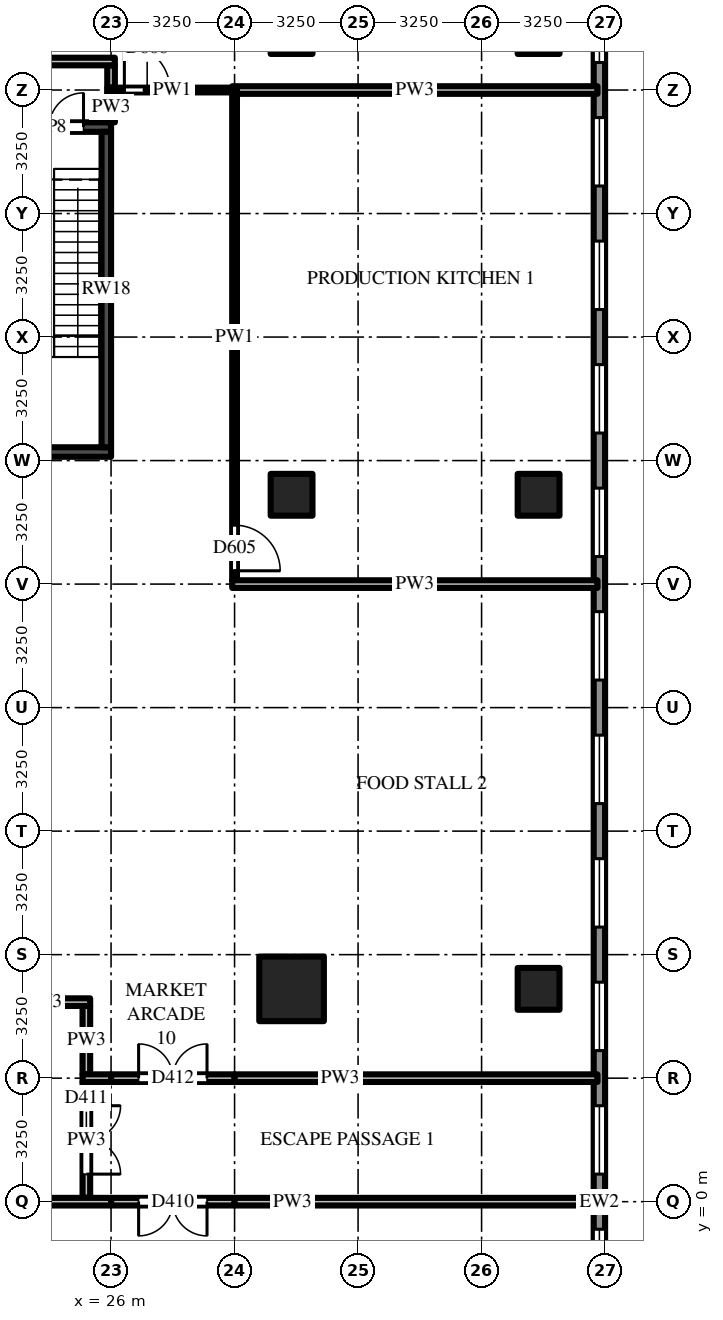
"""IFC4 building model, lengths in metres.
Left out: names, types, materials, properties, quantities, classifications, styles, units other than length and angle.
Written with IfcOpenShell. Run it as: python <this file> out.ifc"""

import sys

from ifc_helpers import new_model, si_unit, direction, frame, frame_2d, origin, origin_2d, place, context, subcontext, project, spatial, rectangle, extrude, source, transform, mapped, element, fill, save


model = new_model("IFC4")
c1 = context("Model", 3, precision=1e-05, world=origin(), true_north=direction((0.0, 1.0)))
c2 = subcontext(c1, "Body", "Model", "MODEL_VIEW")
j1 = project(units=[si_unit("LENGTHUNIT", "METRE"), si_unit("PLANEANGLEUNIT", "RADIAN")], contexts=[c1])
p1 = place(None, origin())
s1 = spatial("IfcSite", under=j1, at=p1, CompositionType="ELEMENT")
p2 = place(p1, origin())
s2 = spatial("IfcBuilding", under=s1, at=p2, CompositionType="ELEMENT")
p3 = place(p2, frame((0.0, 0.0, 14.0)))
s3 = spatial("IfcBuildingStorey", under=s2, at=p3, CompositionType="ELEMENT", Elevation=14.0)
m1 = source(origin(), c2, "Body", "SweptSolid", [
    extrude(rectangle(XDim=1.7, YDim=1.7, at=origin_2d()), origin(), (0.0, 0.0, 1.0), 5.0),
])
p4 = place(p3, frame((30.75, 5.6, 0.0), z_axis=(0.0, 0.0, 1.0), x_axis=(1.0, 0.0, 0.0)))
e1 = element("IfcColumn", 1, at=p4, inside=s3, PredefinedType="COLUMN", context=c2, shape_type="MappedRepresentation", body=[
    mapped(m1, transform((0.0, 0.0, 0.0))),
])
m2 = source(origin(), c2, "Body", "SweptSolid", [
    extrude(rectangle(XDim=1.1, YDim=1.1, at=origin_2d()), origin(), (0.0, 0.0, 1.0), 5.0),
])
for number, where, z_axis, x_axis in (
    (2, (30.75, 18.6, 0.0), (0.0, 0.0, 1.0), (1.0, 0.0, 0.0)),
    (3, (30.75, 30.75, 0.0), (0.0, 0.0, 1.0), (1.0, 0.0, 0.0)),
    (4, (37.25, 5.6, 0.0), (0.0, 0.0, 1.0), (1.0, 0.0, 0.0)),
    (5, (37.25, 18.6, 0.0), (0.0, 0.0, 1.0), (1.0, 0.0, 0.0)),
    (6, (37.25, 30.75, 0.0), (0.0, 0.0, 1.0), (1.0, 0.0, 0.0)),
):
    element("IfcColumn", number, at=place(p3, frame(where, z_axis=z_axis, x_axis=x_axis)), inside=s3, PredefinedType="COLUMN", context=c2, shape_type="MappedRepresentation", body=[
        mapped(m2, transform((0.0, 0.0, 0.0))),
    ])
m3 = source(origin(), c2, "Body", "SweptSolid", [
    extrude(rectangle(XDim=6.5, YDim=0.25, at=frame_2d((3.25, 0.0))), origin(), (0.0, 0.0, 1.0), 4.7),
])
p5 = place(p3, frame((19.5, 28.275, 0.0), z_axis=(0.0, 0.0, 1.0), x_axis=(1.0, 0.0, 0.0)))
e7 = element("IfcWall", 7, at=p5, inside=s3, PredefinedType="SHEAR", context=c2, shape_type="MappedRepresentation", body=[
    mapped(m3, transform((0.0, 0.0, 0.0))),
])
m4 = source(origin(), c2, "Body", "SweptSolid", [
    extrude(rectangle(XDim=1.8, YDim=2.1, at=frame_2d((0.9, 1.05))), frame((0.0, 0.135, 0.0), z_axis=(0.0, -1.0, 0.0), x_axis=(1.0, 0.0, 0.0)), (0.0, 0.0, 1.0), 0.27),
])
p6 = place(p5, frame((0.725, 0.0, 0.0)))
e8 = element("IfcOpeningElement", 8, at=p6, cuts=e7, PredefinedType="OPENING", context=c2, shape_type="MappedRepresentation", body=[
    mapped(m4, transform((0.0, 0.0, 0.0))),
])
p7 = place(p5, frame((3.975, 0.0, 0.0)))
e9 = element("IfcOpeningElement", 9, at=p7, cuts=e7, PredefinedType="OPENING", context=c2, shape_type="MappedRepresentation", body=[
    mapped(m4, transform((0.0, 0.0, 0.0))),
])
p8 = place(p3, frame((19.5, 19.725, 0.0), z_axis=(0.0, 0.0, 1.0), x_axis=(1.0, 0.0, 0.0)))
e10 = element("IfcWall", 10, at=p8, inside=s3, PredefinedType="SHEAR", context=c2, shape_type="MappedRepresentation", body=[
    mapped(m3, transform((0.0, 0.0, 0.0))),
])
m5 = source(origin(), c2, "Body", "SweptSolid", [
    extrude(rectangle(XDim=8.3, YDim=0.25, at=frame_2d((4.15, 0.0))), origin(), (0.0, 0.0, 1.0), 4.7),
])
p9 = place(p3, frame((25.875, 19.85, 0.0), z_axis=(0.0, 0.0, 1.0), x_axis=(0.0, 1.0, 0.0)))
e11 = element("IfcWall", 11, at=p9, inside=s3, PredefinedType="SHEAR", context=c2, shape_type="MappedRepresentation", body=[
    mapped(m5, transform((0.0, 0.0, 0.0))),
])
m6 = source(origin(), c2, "Body", "SweptSolid", [
    extrude(rectangle(XDim=71.5, YDim=0.3, at=frame_2d((35.75, 0.0))), origin(), (0.0, 0.0, 1.0), 4.7),
])
p10 = place(p3, frame((38.85, -35.75, 0.0), z_axis=(0.0, 0.0, 1.0), x_axis=(0.0, 1.0, 0.0)))
e12 = element("IfcWall", 12, at=p10, inside=s3, PredefinedType="SOLIDWALL", context=c2, shape_type="MappedRepresentation", body=[
    mapped(m6, transform((0.0, 0.0, 0.0))),
])
m7 = source(origin(), c2, "Body", "SweptSolid", [
    extrude(rectangle(XDim=1.8, YDim=3.0, at=frame_2d((0.9, 1.5))), frame((0.0, 0.16, 0.0), z_axis=(0.0, -1.0, 0.0), x_axis=(1.0, 0.0, 0.0)), (0.0, 0.0, 1.0), 0.32),
])
p11 = place(p10, frame((0.725, 0.0, 0.9)))
e13 = element("IfcOpeningElement", 13, at=p11, cuts=e12, PredefinedType="OPENING", context=c2, shape_type="MappedRepresentation", body=[
    mapped(m7, transform((0.0, 0.0, 0.0))),
])
p12 = place(p10, frame((3.975, 0.0, 0.9)))
e14 = element("IfcOpeningElement", 14, at=p12, cuts=e12, PredefinedType="OPENING", context=c2, shape_type="MappedRepresentation", body=[
    mapped(m7, transform((0.0, 0.0, 0.0))),
])
p13 = place(p10, frame((7.225, 0.0, 0.9)))
e15 = element("IfcOpeningElement", 15, at=p13, cuts=e12, PredefinedType="OPENING", context=c2, shape_type="MappedRepresentation", body=[
    mapped(m7, transform((0.0, 0.0, 0.0))),
])
p14 = place(p10, frame((10.475, 0.0, 0.9)))
e16 = element("IfcOpeningElement", 16, at=p14, cuts=e12, PredefinedType="OPENING", context=c2, shape_type="MappedRepresentation", body=[
    mapped(m7, transform((0.0, 0.0, 0.0))),
])
p15 = place(p10, frame((13.725, 0.0, 0.9)))
e17 = element("IfcOpeningElement", 17, at=p15, cuts=e12, PredefinedType="OPENING", context=c2, shape_type="MappedRepresentation", body=[
    mapped(m7, transform((0.0, 0.0, 0.0))),
])
p16 = place(p10, frame((16.975, 0.0, 0.9)))
e18 = element("IfcOpeningElement", 18, at=p16, cuts=e12, PredefinedType="OPENING", context=c2, shape_type="MappedRepresentation", body=[
    mapped(m7, transform((0.0, 0.0, 0.0))),
])
p17 = place(p10, frame((20.225, 0.0, 0.9)))
e19 = element("IfcOpeningElement", 19, at=p17, cuts=e12, PredefinedType="OPENING", context=c2, shape_type="MappedRepresentation", body=[
    mapped(m7, transform((0.0, 0.0, 0.0))),
])
p18 = place(p10, frame((23.475, 0.0, 0.9)))
e20 = element("IfcOpeningElement", 20, at=p18, cuts=e12, PredefinedType="OPENING", context=c2, shape_type="MappedRepresentation", body=[
    mapped(m7, transform((0.0, 0.0, 0.0))),
])
p19 = place(p10, frame((26.725, 0.0, 0.9)))
e21 = element("IfcOpeningElement", 21, at=p19, cuts=e12, PredefinedType="OPENING", context=c2, shape_type="MappedRepresentation", body=[
    mapped(m7, transform((0.0, 0.0, 0.0))),
])
p20 = place(p10, frame((29.975, 0.0, 0.9)))
e22 = element("IfcOpeningElement", 22, at=p20, cuts=e12, PredefinedType="OPENING", context=c2, shape_type="MappedRepresentation", body=[
    mapped(m7, transform((0.0, 0.0, 0.0))),
])
p21 = place(p10, frame((33.225, 0.0, 0.9)))
e23 = element("IfcOpeningElement", 23, at=p21, cuts=e12, PredefinedType="OPENING", context=c2, shape_type="MappedRepresentation", body=[
    mapped(m7, transform((0.0, 0.0, 0.0))),
])
p22 = place(p10, frame((36.475, 0.0, 0.9)))
e24 = element("IfcOpeningElement", 24, at=p22, cuts=e12, PredefinedType="OPENING", context=c2, shape_type="MappedRepresentation", body=[
    mapped(m7, transform((0.0, 0.0, 0.0))),
])
p23 = place(p10, frame((39.725, 0.0, 0.9)))
e25 = element("IfcOpeningElement", 25, at=p23, cuts=e12, PredefinedType="OPENING", context=c2, shape_type="MappedRepresentation", body=[
    mapped(m7, transform((0.0, 0.0, 0.0))),
])
p24 = place(p10, frame((42.975, 0.0, 0.9)))
e26 = element("IfcOpeningElement", 26, at=p24, cuts=e12, PredefinedType="OPENING", context=c2, shape_type="MappedRepresentation", body=[
    mapped(m7, transform((0.0, 0.0, 0.0))),
])
p25 = place(p10, frame((46.225, 0.0, 0.9)))
e27 = element("IfcOpeningElement", 27, at=p25, cuts=e12, PredefinedType="OPENING", context=c2, shape_type="MappedRepresentation", body=[
    mapped(m7, transform((0.0, 0.0, 0.0))),
])
p26 = place(p10, frame((49.475, 0.0, 0.9)))
e28 = element("IfcOpeningElement", 28, at=p26, cuts=e12, PredefinedType="OPENING", context=c2, shape_type="MappedRepresentation", body=[
    mapped(m7, transform((0.0, 0.0, 0.0))),
])
p27 = place(p10, frame((52.725, 0.0, 0.9)))
e29 = element("IfcOpeningElement", 29, at=p27, cuts=e12, PredefinedType="OPENING", context=c2, shape_type="MappedRepresentation", body=[
    mapped(m7, transform((0.0, 0.0, 0.0))),
])
p28 = place(p10, frame((55.975, 0.0, 0.9)))
e30 = element("IfcOpeningElement", 30, at=p28, cuts=e12, PredefinedType="OPENING", context=c2, shape_type="MappedRepresentation", body=[
    mapped(m7, transform((0.0, 0.0, 0.0))),
])
p29 = place(p10, frame((59.225, 0.0, 0.9)))
e31 = element("IfcOpeningElement", 31, at=p29, cuts=e12, PredefinedType="OPENING", context=c2, shape_type="MappedRepresentation", body=[
    mapped(m7, transform((0.0, 0.0, 0.0))),
])
p30 = place(p10, frame((62.475, 0.0, 0.9)))
e32 = element("IfcOpeningElement", 32, at=p30, cuts=e12, PredefinedType="OPENING", context=c2, shape_type="MappedRepresentation", body=[
    mapped(m7, transform((0.0, 0.0, 0.0))),
])
p31 = place(p10, frame((65.725, 0.0, 0.9)))
e33 = element("IfcOpeningElement", 33, at=p31, cuts=e12, PredefinedType="OPENING", context=c2, shape_type="MappedRepresentation", body=[
    mapped(m7, transform((0.0, 0.0, 0.0))),
])
p32 = place(p10, frame((68.975, 0.0, 0.9)))
e34 = element("IfcOpeningElement", 34, at=p32, cuts=e12, PredefinedType="OPENING", context=c2, shape_type="MappedRepresentation", body=[
    mapped(m7, transform((0.0, 0.0, 0.0))),
])
m8 = source(origin(), c2, "Body", "SweptSolid", [
    extrude(rectangle(XDim=3.05, YDim=0.2, at=frame_2d((1.525, 0.0))), origin(), (0.0, 0.0, 1.0), 4.077),
])
p33 = place(p3, frame((25.35, 3.15, 0.0), z_axis=(0.0, 0.0, 1.0), x_axis=(0.0, -1.0, 0.0)))
e35 = element("IfcWall", 35, at=p33, inside=s3, PredefinedType="PARTITIONING", context=c2, shape_type="MappedRepresentation", body=[
    mapped(m8, transform((0.0, 0.0, 0.0))),
])
m9 = source(origin(), c2, "Body", "SweptSolid", [
    extrude(rectangle(XDim=1.8, YDim=2.1, at=frame_2d((0.9, 1.05))), frame((0.0, 0.11, 0.0), z_axis=(0.0, -1.0, 0.0), x_axis=(1.0, 0.0, 0.0)), (0.0, 0.0, 1.0), 0.22),
])
p34 = place(p33, frame((0.625, 0.0, 0.0)))
e36 = element("IfcOpeningElement", 36, at=p34, cuts=e35, PredefinedType="OPENING", context=c2, shape_type="MappedRepresentation", body=[
    mapped(m9, transform((0.0, 0.0, 0.0))),
])
m10 = source(origin(), c2, "Body", "SweptSolid", [
    extrude(rectangle(XDim=1.8, YDim=0.2, at=frame_2d((0.9, 0.0))), origin(), (0.0, 0.0, 1.0), 4.7),
])
p35 = place(p3, frame((25.35, 3.35, 0.0), z_axis=(0.0, 0.0, 1.0), x_axis=(0.0, 1.0, 0.0)))
e37 = element("IfcWall", 37, at=p35, inside=s3, PredefinedType="PARTITIONING", context=c2, shape_type="MappedRepresentation", body=[
    mapped(m10, transform((0.0, 0.0, 0.0))),
])
m11 = source(origin(), c2, "Body", "SweptSolid", [
    extrude(rectangle(XDim=0.788, YDim=0.2, at=frame_2d((0.394, 0.0))), origin(), (0.0, 0.0, 1.0), 4.7),
])
p36 = place(p3, frame((26.0, 28.4, 0.0), z_axis=(0.0, 0.0, 1.0), x_axis=(0.0, 1.0, 0.0)))
e38 = element("IfcWall", 38, at=p36, inside=s3, PredefinedType="PARTITIONING", context=c2, shape_type="MappedRepresentation", body=[
    mapped(m11, transform((0.0, 0.0, 0.0))),
])
m12 = source(origin(), c2, "Body", "SweptSolid", [
    extrude(rectangle(XDim=0.587, YDim=0.2, at=frame_2d((0.294, 0.0))), origin(), (0.0, 0.0, 1.0), 4.7),
])
p37 = place(p3, frame((26.0, 29.9, 0.0), z_axis=(0.0, 0.0, 1.0), x_axis=(0.0, -1.0, 0.0)))
e39 = element("IfcWall", 39, at=p37, inside=s3, PredefinedType="PARTITIONING", context=c2, shape_type="MappedRepresentation", body=[
    mapped(m12, transform((0.0, 0.0, 0.0))),
])
m13 = source(origin(), c2, "Body", "SweptSolid", [
    extrude(rectangle(XDim=12.8, YDim=0.125, at=frame_2d((6.4, 0.0))), origin(), (0.0, 0.0, 1.0), 3.762),
])
p38 = place(p3, frame((29.25, 29.15, 0.0), z_axis=(0.0, 0.0, 1.0), x_axis=(0.0, -1.0, 0.0)))
e40 = element("IfcWall", 40, at=p38, inside=s3, PredefinedType="PARTITIONING", context=c2, shape_type="MappedRepresentation", body=[
    mapped(m13, transform((0.0, 0.0, 0.0))),
])
m14 = source(origin(), c2, "Body", "SweptSolid", [
    extrude(rectangle(XDim=1.2, YDim=2.1, at=frame_2d((0.6, 1.05))), frame((0.0, 0.073, 0.0), z_axis=(0.0, -1.0, 0.0), x_axis=(1.0, 0.0, 0.0)), (0.0, 0.0, 1.0), 0.145),
])
p39 = place(p38, frame((11.35, 0.0, 0.0)))
e41 = element("IfcOpeningElement", 41, at=p39, cuts=e40, PredefinedType="OPENING", context=c2, shape_type="MappedRepresentation", body=[
    mapped(m14, transform((0.0, 0.0, 0.0))),
])
m15 = source(origin(), c2, "Body", "SweptSolid", [
    extrude(rectangle(XDim=3.25, YDim=0.2, at=frame_2d((1.625, 0.0))), origin(), (0.0, 0.0, 1.0), 4.077),
])
p40 = place(p3, frame((29.25, 0.0, 0.0), z_axis=(0.0, 0.0, 1.0), x_axis=(-1.0, 0.0, 0.0)))
e42 = element("IfcWall", 42, at=p40, inside=s3, PredefinedType="PARTITIONING", context=c2, shape_type="MappedRepresentation", body=[
    mapped(m15, transform((0.0, 0.0, 0.0))),
])
p41 = place(p40, frame((0.725, 0.0, 0.0)))
e43 = element("IfcOpeningElement", 43, at=p41, cuts=e42, PredefinedType="OPENING", context=c2, shape_type="MappedRepresentation", body=[
    mapped(m9, transform((0.0, 0.0, 0.0))),
])
m16 = source(origin(), c2, "Body", "SweptSolid", [
    extrude(rectangle(XDim=2.0, YDim=0.2, at=frame_2d((1.0, 0.0))), origin(), (0.0, 0.0, 1.0), 4.077),
])
p42 = place(p3, frame((26.0, 0.0, 0.0), z_axis=(0.0, 0.0, 1.0), x_axis=(-1.0, 0.0, 0.0)))
e44 = element("IfcWall", 44, at=p42, inside=s3, PredefinedType="PARTITIONING", context=c2, shape_type="MappedRepresentation", body=[
    mapped(m16, transform((0.0, 0.0, 0.0))),
])
m17 = source(origin(), c2, "Body", "SweptSolid", [
    extrude(rectangle(XDim=9.55, YDim=0.2, at=frame_2d((4.775, 0.0))), origin(), (0.0, 0.0, 1.0), 3.918),
])
p43 = place(p3, frame((38.8, 0.0, 0.0), z_axis=(0.0, 0.0, 1.0), x_axis=(-1.0, 0.0, 0.0)))
e45 = element("IfcWall", 45, at=p43, inside=s3, PredefinedType="PARTITIONING", context=c2, shape_type="MappedRepresentation", body=[
    mapped(m17, transform((0.0, 0.0, 0.0))),
])
m18 = source(origin(), c2, "Body", "SweptSolid", [
    extrude(rectangle(XDim=3.25, YDim=0.2, at=frame_2d((1.625, 0.0))), origin(), (0.0, 0.0, 1.0), 4.7),
])
p44 = place(p3, frame((26.0, 3.25, 0.0), z_axis=(0.0, 0.0, 1.0), x_axis=(1.0, 0.0, 0.0)))
e46 = element("IfcWall", 46, at=p44, inside=s3, PredefinedType="PARTITIONING", context=c2, shape_type="MappedRepresentation", body=[
    mapped(m18, transform((0.0, 0.0, 0.0))),
])
p45 = place(p44, frame((0.725, 0.0, 0.0)))
e47 = element("IfcOpeningElement", 47, at=p45, cuts=e46, PredefinedType="OPENING", context=c2, shape_type="MappedRepresentation", body=[
    mapped(m9, transform((0.0, 0.0, 0.0))),
])
m19 = source(origin(), c2, "Body", "SweptSolid", [
    extrude(rectangle(XDim=0.75, YDim=0.2, at=frame_2d((0.375, 0.0))), origin(), (0.0, 0.0, 1.0), 4.7),
])
p46 = place(p3, frame((25.25, 3.25, 0.0), z_axis=(0.0, 0.0, 1.0), x_axis=(1.0, 0.0, 0.0)))
e48 = element("IfcWall", 48, at=p46, inside=s3, PredefinedType="PARTITIONING", context=c2, shape_type="MappedRepresentation", body=[
    mapped(m19, transform((0.0, 0.0, 0.0))),
])
p47 = place(p3, frame((29.25, 3.25, 0.0), z_axis=(0.0, 0.0, 1.0), x_axis=(1.0, 0.0, 0.0)))
e49 = element("IfcWall", 49, at=p47, inside=s3, PredefinedType="PARTITIONING", context=c2, shape_type="MappedRepresentation", body=[
    mapped(m17, transform((0.0, 0.0, 0.0))),
])
m20 = source(origin(), c2, "Body", "SweptSolid", [
    extrude(rectangle(XDim=1.45, YDim=0.2, at=frame_2d((0.725, 0.0))), origin(), (0.0, 0.0, 1.0), 4.7),
])
p48 = place(p3, frame((24.0, 5.25, 0.0), z_axis=(0.0, 0.0, 1.0), x_axis=(1.0, 0.0, 0.0)))
e50 = element("IfcWall", 50, at=p48, inside=s3, PredefinedType="PARTITIONING", context=c2, shape_type="MappedRepresentation", body=[
    mapped(m20, transform((0.0, 0.0, 0.0))),
])
m21 = source(origin(), c2, "Body", "SweptSolid", [
    extrude(rectangle(XDim=9.613, YDim=0.2, at=frame_2d((4.806, 0.0))), origin(), (0.0, 0.0, 1.0), 3.762),
])
for number, where, z_axis, x_axis in (
    (51, (29.188, 16.25, 0.0), (0.0, 0.0, 1.0), (1.0, 0.0, 0.0)),
    (52, (29.188, 29.25, 0.0), (0.0, 0.0, 1.0), (1.0, 0.0, 0.0)),
):
    element("IfcWall", number, at=place(p3, frame(where, z_axis=z_axis, x_axis=x_axis)), inside=s3, PredefinedType="PARTITIONING", context=c2, shape_type="MappedRepresentation", body=[
        mapped(m21, transform((0.0, 0.0, 0.0))),
    ])
m22 = source(origin(), c2, "Body", "SweptSolid", [
    extrude(rectangle(XDim=3.413, YDim=0.125, at=frame_2d((1.706, 0.0))), origin(), (0.0, 0.0, 1.0), 4.7),
])
p49 = place(p3, frame((25.9, 29.25, 0.0), z_axis=(0.0, 0.0, 1.0), x_axis=(1.0, 0.0, 0.0)))
e53 = element("IfcWall", 53, at=p49, inside=s3, PredefinedType="PARTITIONING", context=c2, shape_type="MappedRepresentation", body=[
    mapped(m22, transform((0.0, 0.0, 0.0))),
])
p50 = place(p49, frame((0.45, 0.0, 0.0)))
e54 = element("IfcOpeningElement", 54, at=p50, cuts=e53, PredefinedType="OPENING", context=c2, shape_type="MappedRepresentation", body=[
    mapped(m14, transform((0.0, 0.0, 0.0))),
])
m23 = source(origin(), c2, "Body", "SweptSolid", [
    extrude(rectangle(XDim=8.2, YDim=0.2, at=frame_2d((4.1, 0.0))), origin(), (0.0, 0.0, 1.0), 3.762),
])
p51 = place(p3, frame((17.9, 30.0, 0.0), z_axis=(0.0, 0.0, 1.0), x_axis=(1.0, 0.0, 0.0)))
e55 = element("IfcWall", 55, at=p51, inside=s3, PredefinedType="PARTITIONING", context=c2, shape_type="MappedRepresentation", body=[
    mapped(m23, transform((0.0, 0.0, 0.0))),
])
m24 = source(origin(), c2, "Body", "SweptSolid", [
    extrude(rectangle(XDim=1.8, YDim=2.1, at=frame_2d((0.9, 1.05))), frame((0.0, 0.025, 0.0), z_axis=(0.0, -1.0, 0.0), x_axis=(1.0, 0.0, 0.0)), (0.0, 0.0, 1.0), 0.05),
])
p52 = place(p7, origin())
e56 = element("IfcDoor", 56, at=p52, inside=s3, OperationType="DOUBLE_DOOR_SINGLE_SWING", PredefinedType="DOOR", context=c2, shape_type="MappedRepresentation", body=[
    mapped(m24, transform((0.0, 0.0, 0.0))),
])
fill(e9, e56)
m25 = source(origin(), c2, "Body", "SweptSolid", [
    extrude(rectangle(XDim=1.8, YDim=3.0, at=frame_2d((0.9, 1.5))), frame((0.0, 0.03, 0.0), z_axis=(0.0, -1.0, 0.0), x_axis=(1.0, 0.0, 0.0)), (0.0, 0.0, 1.0), 0.06),
])
p53 = place(p21, origin())
e57 = element("IfcWindow", 57, at=p53, inside=s3, PartitioningType="SINGLE_PANEL", PredefinedType="WINDOW", context=c2, shape_type="MappedRepresentation", body=[
    mapped(m25, transform((0.0, 0.0, 0.0))),
])
fill(e23, e57)
p54 = place(p22, origin())
e58 = element("IfcWindow", 58, at=p54, inside=s3, PartitioningType="SINGLE_PANEL", PredefinedType="WINDOW", context=c2, shape_type="MappedRepresentation", body=[
    mapped(m25, transform((0.0, 0.0, 0.0))),
])
fill(e24, e58)
p55 = place(p23, origin())
e59 = element("IfcWindow", 59, at=p55, inside=s3, PartitioningType="SINGLE_PANEL", PredefinedType="WINDOW", context=c2, shape_type="MappedRepresentation", body=[
    mapped(m25, transform((0.0, 0.0, 0.0))),
])
fill(e25, e59)
p56 = place(p24, origin())
e60 = element("IfcWindow", 60, at=p56, inside=s3, PartitioningType="SINGLE_PANEL", PredefinedType="WINDOW", context=c2, shape_type="MappedRepresentation", body=[
    mapped(m25, transform((0.0, 0.0, 0.0))),
])
fill(e26, e60)
p57 = place(p25, origin())
e61 = element("IfcWindow", 61, at=p57, inside=s3, PartitioningType="SINGLE_PANEL", PredefinedType="WINDOW", context=c2, shape_type="MappedRepresentation", body=[
    mapped(m25, transform((0.0, 0.0, 0.0))),
])
fill(e27, e61)
p58 = place(p26, origin())
e62 = element("IfcWindow", 62, at=p58, inside=s3, PartitioningType="SINGLE_PANEL", PredefinedType="WINDOW", context=c2, shape_type="MappedRepresentation", body=[
    mapped(m25, transform((0.0, 0.0, 0.0))),
])
fill(e28, e62)
p59 = place(p27, origin())
e63 = element("IfcWindow", 63, at=p59, inside=s3, PartitioningType="SINGLE_PANEL", PredefinedType="WINDOW", context=c2, shape_type="MappedRepresentation", body=[
    mapped(m25, transform((0.0, 0.0, 0.0))),
])
fill(e29, e63)
p60 = place(p28, origin())
e64 = element("IfcWindow", 64, at=p60, inside=s3, PartitioningType="SINGLE_PANEL", PredefinedType="WINDOW", context=c2, shape_type="MappedRepresentation", body=[
    mapped(m25, transform((0.0, 0.0, 0.0))),
])
fill(e30, e64)
p61 = place(p29, origin())
e65 = element("IfcWindow", 65, at=p61, inside=s3, PartitioningType="SINGLE_PANEL", PredefinedType="WINDOW", context=c2, shape_type="MappedRepresentation", body=[
    mapped(m25, transform((0.0, 0.0, 0.0))),
])
fill(e31, e65)
p62 = place(p30, origin())
e66 = element("IfcWindow", 66, at=p62, inside=s3, PartitioningType="SINGLE_PANEL", PredefinedType="WINDOW", context=c2, shape_type="MappedRepresentation", body=[
    mapped(m25, transform((0.0, 0.0, 0.0))),
])
fill(e32, e66)
p63 = place(p31, origin())
e67 = element("IfcWindow", 67, at=p63, inside=s3, PartitioningType="SINGLE_PANEL", PredefinedType="WINDOW", context=c2, shape_type="MappedRepresentation", body=[
    mapped(m25, transform((0.0, 0.0, 0.0))),
])
fill(e33, e67)
p64 = place(p41, origin())
e68 = element("IfcDoor", 68, at=p64, inside=s3, OperationType="DOUBLE_DOOR_SINGLE_SWING", PredefinedType="DOOR", context=c2, shape_type="MappedRepresentation", body=[
    mapped(m24, transform((0.0, 0.0, 0.0))),
])
fill(e43, e68)
p65 = place(p34, origin())
e69 = element("IfcDoor", 69, at=p65, inside=s3, OperationType="DOUBLE_DOOR_SINGLE_SWING", PredefinedType="DOOR", context=c2, shape_type="MappedRepresentation", body=[
    mapped(m24, transform((0.0, 0.0, 0.0))),
])
fill(e36, e69)
p66 = place(p45, origin())
e70 = element("IfcDoor", 70, at=p66, inside=s3, OperationType="DOUBLE_DOOR_SINGLE_SWING", PredefinedType="DOOR", context=c2, shape_type="MappedRepresentation", body=[
    mapped(m24, transform((0.0, 0.0, 0.0))),
])
fill(e47, e70)
m26 = source(origin(), c2, "Body", "SweptSolid", [
    extrude(rectangle(XDim=1.2, YDim=2.1, at=frame_2d((0.6, 1.05))), frame((0.0, 0.025, 0.0), z_axis=(0.0, -1.0, 0.0), x_axis=(1.0, 0.0, 0.0)), (0.0, 0.0, 1.0), 0.05),
])
p67 = place(p39, origin())
e71 = element("IfcDoor", 71, at=p67, inside=s3, OperationType="SINGLE_SWING_RIGHT", PredefinedType="DOOR", context=c2, shape_type="MappedRepresentation", body=[
    mapped(m26, transform((0.0, 0.0, 0.0))),
])
fill(e41, e71)
p68 = place(p50, origin())
e72 = element("IfcDoor", 72, at=p68, inside=s3, OperationType="SINGLE_SWING_LEFT", PredefinedType="DOOR", context=c2, shape_type="MappedRepresentation", body=[
    mapped(m26, transform((0.0, 0.0, 0.0))),
])
fill(e54, e72)
save(model, sys.argv[1])
